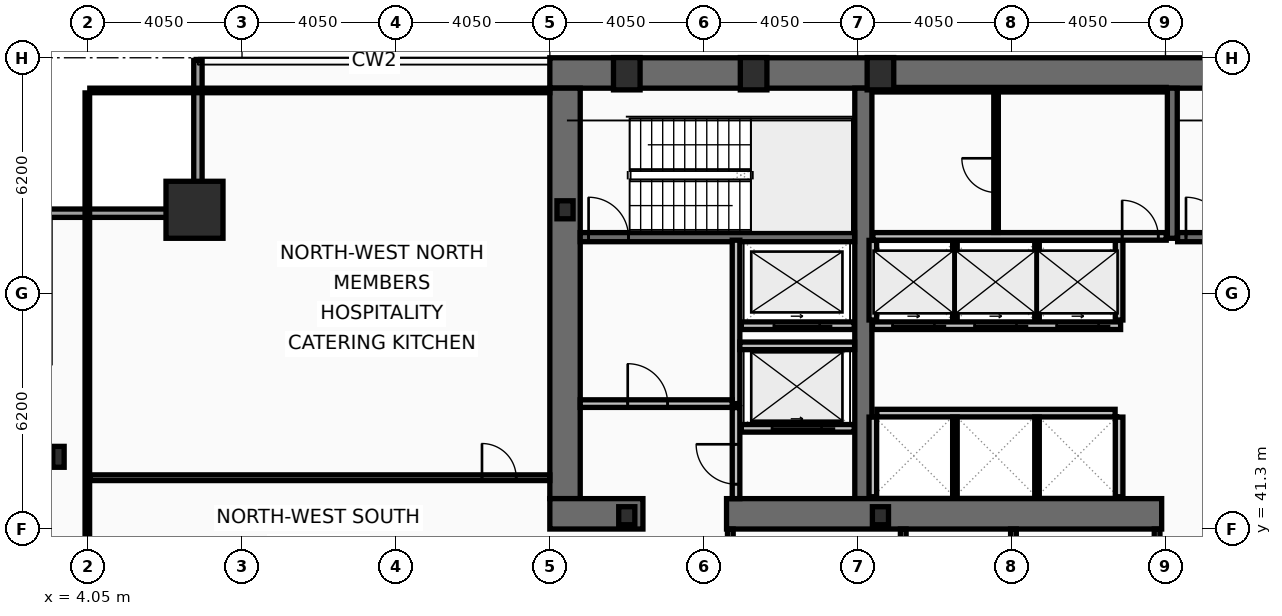
"""IFC4 building model, lengths in metres.
Left out: names, types, materials, properties, quantities, classifications, styles, units other than length and angle.
Written with IfcOpenShell. Run it as: python <this file> out.ifc"""

import sys

from ifc_helpers import new_model, si_unit, direction, frame, frame_2d, origin, origin_2d, place, context, subcontext, project, spatial, rectangle, hollow_rectangle, i_section, extrude, element, fill, save


model = new_model("IFC4")
c1 = context("Model", 3, precision=1e-05, world=origin(), true_north=direction((0.0, 1.0)))
c2 = subcontext(c1, "Body", "Model", "MODEL_VIEW")
j1 = project(units=[si_unit("LENGTHUNIT", "METRE"), si_unit("PLANEANGLEUNIT", "RADIAN")], contexts=[c1])
p1 = place(None, origin())
s1 = spatial("IfcSite", under=j1, at=p1, CompositionType="ELEMENT")
p2 = place(p1, origin())
s2 = spatial("IfcBuilding", under=s1, at=p2, CompositionType="ELEMENT")
p3 = place(p2, frame((0.0, 0.0, 81.8)))
s3 = spatial("IfcBuildingStorey", under=s2, at=p3, CompositionType="ELEMENT", Elevation=81.8)
p4 = place(p3, frame((16.2, 53.3, 0.0), z_axis=(0.0, 0.0, 1.0), x_axis=(1.0, 0.0, 0.0)))
e1 = element("IfcWall", 1, at=p4, inside=s3, PredefinedType="SHEAR", context=c2, shape_type="SweptSolid", body=[
    extrude(rectangle(XDim=40.5, YDim=0.8, at=frame_2d((20.25, 0.0))), origin(), (0.0, 0.0, 1.0), 3.78),
])
p5 = place(p3, frame((16.6, 42.1, 0.0), z_axis=(0.0, 0.0, 1.0), x_axis=(0.0, 1.0, 0.0)))
e2 = element("IfcWall", 2, at=p5, inside=s3, PredefinedType="SHEAR", context=c2, shape_type="SweptSolid", body=[
    extrude(rectangle(XDim=10.8, YDim=0.8, at=frame_2d((5.4, 0.0))), origin(), (0.0, 0.0, 1.0), 3.78),
])
p6 = place(p3, frame((24.45, 42.1, 0.0), z_axis=(0.0, 0.0, 1.0), x_axis=(0.0, 1.0, 0.0)))
e3 = element("IfcWall", 3, at=p6, inside=s3, PredefinedType="SHEAR", context=c2, shape_type="SweptSolid", body=[
    extrude(rectangle(XDim=10.8, YDim=0.45, at=frame_2d((5.4, 0.0))), origin(), (0.0, 0.0, 1.0), 3.78),
])
p7 = place(p3, frame((18.65, 41.7, 0.0), z_axis=(0.0, 0.0, 1.0), x_axis=(-1.0, 0.0, 0.0)))
e4 = element("IfcWall", 4, at=p7, inside=s3, PredefinedType="SHEAR", context=c2, shape_type="SweptSolid", body=[
    extrude(rectangle(XDim=2.45, YDim=0.8, at=frame_2d((1.225, 0.0))), origin(), (0.0, 0.0, 1.0), 3.78),
])
p8 = place(p3, frame((32.3, 41.7, 0.0), z_axis=(0.0, 0.0, 1.0), x_axis=(-1.0, 0.0, 0.0)))
e5 = element("IfcWall", 5, at=p8, inside=s3, PredefinedType="SHEAR", context=c2, shape_type="SweptSolid", body=[
    extrude(rectangle(XDim=11.45, YDim=0.8, at=frame_2d((5.725, 0.0))), origin(), (0.0, 0.0, 1.0), 3.78),
])
p9 = place(p3, frame((32.58, 48.95, 0.0), z_axis=(0.0, 0.0, 1.0), x_axis=(0.0, 1.0, 0.0)))
e6 = element("IfcWall", 6, at=p9, inside=s3, PredefinedType="SHEAR", context=c2, shape_type="SweptSolid", body=[
    extrude(rectangle(XDim=3.95, YDim=0.26, at=frame_2d((1.975, 0.0))), origin(), (0.0, 0.0, 1.0), 3.78),
])
p10 = place(p3, frame((17.0, 48.98, 0.0), z_axis=(0.0, 0.0, 1.0), x_axis=(1.0, 0.0, 0.0)))
e7 = element("IfcWall", 7, at=p10, inside=s3, PredefinedType="SHEAR", context=c2, shape_type="SweptSolid", body=[
    extrude(rectangle(XDim=7.22, YDim=0.24, at=frame_2d((3.61, 0.0))), origin(), (0.0, 0.0, 1.0), 3.78),
])
p11 = place(p10, frame((0.22, 0.0, 0.0)))
e8 = element("IfcOpeningElement", 8, at=p11, cuts=e7, PredefinedType="OPENING", context=c2, shape_type="SweptSolid", body=[
    extrude(rectangle(XDim=1.05, YDim=2.15, at=frame_2d((0.525, 1.075))), frame((0.0, 0.13, 0.0), z_axis=(0.0, -1.0, 0.0), x_axis=(1.0, 0.0, 0.0)), (0.0, 0.0, 1.0), 0.26),
])
p12 = place(p3, frame((32.72, 48.98, 0.0), z_axis=(0.0, 0.0, 1.0), x_axis=(1.0, 0.0, 0.0)))
e9 = element("IfcWall", 9, at=p12, inside=s3, PredefinedType="SHEAR", context=c2, shape_type="SweptSolid", body=[
    extrude(rectangle(XDim=7.56, YDim=0.24, at=frame_2d((3.78, 0.0))), origin(), (0.0, 0.0, 1.0), 3.78),
])
p13 = place(p12, frame((0.22, 0.0, 0.0)))
e10 = element("IfcOpeningElement", 10, at=p13, cuts=e9, PredefinedType="OPENING", context=c2, shape_type="SweptSolid", body=[
    extrude(rectangle(XDim=1.05, YDim=2.15, at=frame_2d((0.525, 1.075))), frame((0.0, 0.13, 0.0), z_axis=(0.0, -1.0, 0.0), x_axis=(1.0, 0.0, 0.0)), (0.0, 0.0, 1.0), 0.26),
])
p14 = place(p3, frame((6.85, 49.7, 0.0), z_axis=(0.0, 0.0, 1.0), x_axis=(1.0, 0.0, 0.0)))
e11 = element("IfcColumn", 11, at=p14, inside=s3, PredefinedType="COLUMN", context=c2, shape_type="SweptSolid", body=[
    extrude(hollow_rectangle(XDim=1.5, YDim=1.5, WallThickness=0.07, at=origin_2d()), origin(), (0.0, 0.0, 1.0), 4.0),
])
for number, where, z_axis, x_axis in (
    (12, (18.225, 53.28, 0.0), (0.0, 0.0, 1.0), (1.0, 0.0, 0.0)),
    (13, (21.562, 53.28, 0.0), (0.0, 0.0, 1.0), (1.0, 0.0, 0.0)),
    (14, (24.9, 53.28, 0.0), (0.0, 0.0, 1.0), (1.0, 0.0, 0.0)),
):
    element("IfcColumn", number, at=place(p3, frame(where, z_axis=z_axis, x_axis=x_axis)), inside=s3, PredefinedType="COLUMN", context=c2, shape_type="SweptSolid", body=[
        extrude(hollow_rectangle(XDim=0.7, YDim=0.85, WallThickness=0.05, at=origin_2d()), origin(), (0.0, 0.0, 1.0), 4.0),
    ])
p15 = place(p3, frame((3.27, 43.2, 0.0), z_axis=(0.0, 0.0, 1.0), x_axis=(1.0, 0.0, 0.0)))
e15 = element("IfcColumn", 15, at=p15, inside=s3, PredefinedType="COLUMN", context=c2, shape_type="SweptSolid", body=[
    extrude(i_section(OverallWidth=0.3, OverallDepth=0.55, WebThickness=0.015, FlangeThickness=0.029, at=origin_2d()), origin(), (0.0, 0.0, 1.0), 4.0),
])
for number, where, z_axis, x_axis in (
    (16, (16.6, 49.7, 0.0), (0.0, 0.0, 1.0), (1.0, 0.0, 0.0)),
    (17, (18.225, 41.65, 0.0), (0.0, 0.0, 1.0), (1.0, 0.0, 0.0)),
    (18, (24.9, 41.65, 0.0), (0.0, 0.0, 1.0), (1.0, 0.0, 0.0)),
):
    element("IfcColumn", number, at=place(p3, frame(where, z_axis=z_axis, x_axis=x_axis)), inside=s3, PredefinedType="COLUMN", context=c2, shape_type="SweptSolid", body=[
        extrude(i_section(OverallWidth=0.424, OverallDepth=0.474, WebThickness=0.048, FlangeThickness=0.077, at=origin_2d()), origin(), (0.0, 0.0, 1.0), 4.0),
    ])
p16 = place(p3, frame((2.83, 49.61, 0.0), z_axis=(0.0, 0.0, 1.0), x_axis=(1.0, 0.0, 0.0)))
e19 = element("IfcWall", 19, at=p16, inside=s3, PredefinedType="SOLIDWALL", context=c2, shape_type="SweptSolid", body=[
    extrude(rectangle(XDim=4.22, YDim=0.22, at=frame_2d((2.11, 0.0))), origin(), (0.0, 0.0, 1.0), 3.12),
])
p17 = place(p3, frame((6.94, 49.72, 0.0), z_axis=(0.0, 0.0, 1.0), x_axis=(0.0, 1.0, 0.0)))
e20 = element("IfcWall", 20, at=p17, inside=s3, PredefinedType="SOLIDWALL", context=c2, shape_type="SweptSolid", body=[
    extrude(rectangle(XDim=3.91, YDim=0.22, at=frame_2d((1.955, 0.0))), origin(), (0.0, 0.0, 1.0), 3.12),
])
p18 = place(p3, frame((24.21, 43.95, 0.0), z_axis=(0.0, 0.0, 1.0), x_axis=(-1.0, 0.0, 0.0)))
e21 = element("IfcWall", 21, at=p18, inside=s3, PredefinedType="PARTITIONING", context=c2, shape_type="SweptSolid", body=[
    extrude(rectangle(XDim=2.97, YDim=0.2, at=frame_2d((1.485, 0.0))), origin(), (0.0, 0.0, 1.0), 3.78),
])
p19 = place(p18, frame((0.86, 0.0, 0.0)))
e22 = element("IfcOpeningElement", 22, at=p19, cuts=e21, PredefinedType="OPENING", context=c2, shape_type="SweptSolid", body=[
    extrude(rectangle(XDim=1.3, YDim=2.18, at=frame_2d((0.65, 1.09))), frame((0.0, 0.11, 0.0), z_axis=(0.0, -1.0, 0.0), x_axis=(1.0, 0.0, 0.0)), (0.0, 0.0, 1.0), 0.22),
])
p20 = place(p3, frame((24.21, 46.65, 0.0), z_axis=(0.0, 0.0, 1.0), x_axis=(-1.0, 0.0, 0.0)))
e23 = element("IfcWall", 23, at=p20, inside=s3, PredefinedType="PARTITIONING", context=c2, shape_type="SweptSolid", body=[
    extrude(rectangle(XDim=2.97, YDim=0.2, at=frame_2d((1.485, 0.0))), origin(), (0.0, 0.0, 1.0), 3.78),
])
p21 = place(p20, frame((0.91, 0.0, 0.0)))
e24 = element("IfcOpeningElement", 24, at=p21, cuts=e23, PredefinedType="OPENING", context=c2, shape_type="SweptSolid", body=[
    extrude(rectangle(XDim=1.2, YDim=2.18, at=frame_2d((0.6, 1.09))), frame((0.0, 0.11, 0.0), z_axis=(0.0, -1.0, 0.0), x_axis=(1.0, 0.0, 0.0)), (0.0, 0.0, 1.0), 0.22),
])
p22 = place(p3, frame((31.22, 46.65, 0.0), z_axis=(0.0, 0.0, 1.0), x_axis=(-1.0, 0.0, 0.0)))
e25 = element("IfcWall", 25, at=p22, inside=s3, PredefinedType="PARTITIONING", context=c2, shape_type="SweptSolid", body=[
    extrude(rectangle(XDim=6.53, YDim=0.2, at=frame_2d((3.265, 0.0))), origin(), (0.0, 0.0, 1.0), 3.78),
])
p23 = place(p22, frame((4.9, 0.0, 0.0)))
e26 = element("IfcOpeningElement", 26, at=p23, cuts=e25, PredefinedType="OPENING", context=c2, shape_type="SweptSolid", body=[
    extrude(rectangle(XDim=1.1, YDim=2.18, at=frame_2d((0.55, 1.09))), frame((0.0, 0.11, 0.0), z_axis=(0.0, -1.0, 0.0), x_axis=(1.0, 0.0, 0.0)), (0.0, 0.0, 1.0), 0.22),
])
p24 = place(p22, frame((2.74, 0.0, 0.0)))
e27 = element("IfcOpeningElement", 27, at=p24, cuts=e25, PredefinedType="OPENING", context=c2, shape_type="SweptSolid", body=[
    extrude(rectangle(XDim=1.1, YDim=2.18, at=frame_2d((0.55, 1.09))), frame((0.0, 0.11, 0.0), z_axis=(0.0, -1.0, 0.0), x_axis=(1.0, 0.0, 0.0)), (0.0, 0.0, 1.0), 0.22),
])
p25 = place(p22, frame((0.58, 0.0, 0.0)))
e28 = element("IfcOpeningElement", 28, at=p25, cuts=e25, PredefinedType="OPENING", context=c2, shape_type="SweptSolid", body=[
    extrude(rectangle(XDim=1.1, YDim=2.18, at=frame_2d((0.55, 1.09))), frame((0.0, 0.11, 0.0), z_axis=(0.0, -1.0, 0.0), x_axis=(1.0, 0.0, 0.0)), (0.0, 0.0, 1.0), 0.22),
])
p26 = place(p3, frame((21.1, 44.6, 0.0), z_axis=(0.0, 0.0, 1.0), x_axis=(0.0, 1.0, 0.0)))
e29 = element("IfcWall", 29, at=p26, inside=s3, PredefinedType="PARTITIONING", context=c2, shape_type="SweptSolid", body=[
    extrude(rectangle(XDim=4.3, YDim=0.2, at=frame_2d((2.15, 0.0))), origin(), (0.0, 0.0, 1.0), 3.78),
])
p27 = place(p3, frame((17.0, 44.6, 0.0), z_axis=(0.0, 0.0, 1.0), x_axis=(1.0, 0.0, 0.0)))
e30 = element("IfcWall", 30, at=p27, inside=s3, PredefinedType="PARTITIONING", context=c2, shape_type="SweptSolid", body=[
    extrude(rectangle(XDim=4.0, YDim=0.2, at=frame_2d((2.0, 0.0))), origin(), (0.0, 0.0, 1.0), 3.78),
])
p28 = place(p27, frame((1.25, 0.0, 0.0)))
e31 = element("IfcOpeningElement", 31, at=p28, cuts=e30, PredefinedType="OPENING", context=c2, shape_type="SweptSolid", body=[
    extrude(rectangle(XDim=1.05, YDim=2.15, at=frame_2d((0.525, 1.075))), frame((0.0, 0.11, 0.0), z_axis=(0.0, -1.0, 0.0), x_axis=(1.0, 0.0, 0.0)), (0.0, 0.0, 1.0), 0.22),
])
p29 = place(p3, frame((21.2, 46.12, 0.0), z_axis=(0.0, 0.0, 1.0), x_axis=(1.0, 0.0, 0.0)))
e32 = element("IfcWall", 32, at=p29, inside=s3, PredefinedType="PARTITIONING", context=c2, shape_type="SweptSolid", body=[
    extrude(rectangle(XDim=3.02, YDim=0.2, at=frame_2d((1.51, 0.0))), origin(), (0.0, 0.0, 1.0), 3.78),
])
p30 = place(p3, frame((21.1, 42.1, 0.0), z_axis=(0.0, 0.0, 1.0), x_axis=(0.0, 1.0, 0.0)))
e33 = element("IfcWall", 33, at=p30, inside=s3, PredefinedType="PARTITIONING", context=c2, shape_type="SweptSolid", body=[
    extrude(rectangle(XDim=2.395, YDim=0.2, at=frame_2d((1.198, 0.0))), origin(), (0.0, 0.0, 1.0), 3.78),
])
p31 = place(p30, frame((0.38, 0.0, 0.0)))
e34 = element("IfcOpeningElement", 34, at=p31, cuts=e33, PredefinedType="OPENING", context=c2, shape_type="SweptSolid", body=[
    extrude(rectangle(XDim=1.05, YDim=2.15, at=frame_2d((0.525, 1.075))), frame((0.0, 0.11, 0.0), z_axis=(0.0, -1.0, 0.0), x_axis=(1.0, 0.0, 0.0)), (0.0, 0.0, 1.0), 0.22),
])
for number, where, z_axis, x_axis in (
    (35, (24.7, 46.8, 0.0), (0.0, 0.0, 1.0), (0.0, 1.0, 0.0)),
    (36, (31.18, 46.8, 0.0), (0.0, 0.0, 1.0), (0.0, 1.0, 0.0)),
):
    element("IfcWall", number, at=place(p3, frame(where, z_axis=z_axis, x_axis=x_axis)), inside=s3, PredefinedType="PARTITIONING", context=c2, shape_type="SweptSolid", body=[
        extrude(rectangle(XDim=2.095, YDim=0.2, at=frame_2d((1.047, 0.0))), origin(), (0.0, 0.0, 1.0), 3.78),
    ])
for number, where, z_axis, x_axis in (
    (37, (26.86, 46.8, 0.0), (0.0, 0.0, 1.0), (0.0, 1.0, 0.0)),
    (38, (29.02, 46.8, 0.0), (0.0, 0.0, 1.0), (0.0, 1.0, 0.0)),
):
    element("IfcWall", number, at=place(p3, frame(where, z_axis=z_axis, x_axis=x_axis)), inside=s3, PredefinedType="PARTITIONING", context=c2, shape_type="SweptSolid", body=[
        extrude(rectangle(XDim=2.095, YDim=0.12, at=frame_2d((1.047, 0.0))), origin(), (0.0, 0.0, 1.0), 3.78),
    ])
p32 = place(p3, frame((24.805, 44.35, 0.0), z_axis=(0.0, 0.0, 1.0), x_axis=(1.0, 0.0, 0.0)))
e39 = element("IfcWall", 39, at=p32, inside=s3, PredefinedType="PARTITIONING", context=c2, shape_type="SweptSolid", body=[
    extrude(rectangle(XDim=6.27, YDim=0.2, at=frame_2d((3.135, 0.0))), origin(), (0.0, 0.0, 1.0), 3.78),
])
for number, where, z_axis, x_axis in (
    (40, (24.7, 42.15, 0.0), (0.0, 0.0, 1.0), (0.0, 1.0, 0.0)),
    (41, (31.18, 42.15, 0.0), (0.0, 0.0, 1.0), (0.0, 1.0, 0.0)),
):
    element("IfcWall", number, at=place(p3, frame(where, z_axis=z_axis, x_axis=x_axis)), inside=s3, PredefinedType="PARTITIONING", context=c2, shape_type="SweptSolid", body=[
        extrude(rectangle(XDim=2.095, YDim=0.2, at=frame_2d((1.048, 0.0))), origin(), (0.0, 0.0, 1.0), 3.78),
    ])
for number, where, z_axis, x_axis in (
    (42, (26.86, 42.15, 0.0), (0.0, 0.0, 1.0), (0.0, 1.0, 0.0)),
    (43, (29.02, 42.15, 0.0), (0.0, 0.0, 1.0), (0.0, 1.0, 0.0)),
):
    element("IfcWall", number, at=place(p3, frame(where, z_axis=z_axis, x_axis=x_axis)), inside=s3, PredefinedType="PARTITIONING", context=c2, shape_type="SweptSolid", body=[
        extrude(rectangle(XDim=2.095, YDim=0.12, at=frame_2d((1.048, 0.0))), origin(), (0.0, 0.0, 1.0), 3.78),
    ])
p33 = place(p3, frame((24.7, 52.86, 0.0), z_axis=(0.0, 0.0, 1.0), x_axis=(1.0, 0.0, 0.0)))
e44 = element("IfcWall", 44, at=p33, inside=s3, PredefinedType="PARTITIONING", context=c2, shape_type="SweptSolid", body=[
    extrude(rectangle(XDim=7.72, YDim=0.12, at=frame_2d((3.86, 0.0))), origin(), (0.0, 0.0, 1.0), 3.78),
])
p34 = place(p3, frame((24.7, 49.0, 0.0), z_axis=(0.0, 0.0, 1.0), x_axis=(1.0, 0.0, 0.0)))
e45 = element("IfcWall", 45, at=p34, inside=s3, PredefinedType="PARTITIONING", context=c2, shape_type="SweptSolid", body=[
    extrude(rectangle(XDim=7.72, YDim=0.2, at=frame_2d((3.86, 0.0))), origin(), (0.0, 0.0, 1.0), 3.78),
])
p35 = place(p34, frame((6.56, 0.0, 0.0)))
e46 = element("IfcOpeningElement", 46, at=p35, cuts=e45, PredefinedType="OPENING", context=c2, shape_type="SweptSolid", body=[
    extrude(rectangle(XDim=0.95, YDim=2.1, at=frame_2d((0.475, 1.05))), frame((0.0, 0.11, 0.0), z_axis=(0.0, -1.0, 0.0), x_axis=(1.0, 0.0, 0.0)), (0.0, 0.0, 1.0), 0.22),
])
p36 = place(p3, frame((27.942, 49.105, 0.0), z_axis=(0.0, 0.0, 1.0), x_axis=(0.0, 1.0, 0.0)))
e47 = element("IfcWall", 47, at=p36, inside=s3, PredefinedType="PARTITIONING", context=c2, shape_type="SweptSolid", body=[
    extrude(rectangle(XDim=3.69, YDim=0.12, at=frame_2d((1.845, 0.0))), origin(), (0.0, 0.0, 1.0), 3.78),
])
p37 = place(p36, frame((1.05, 0.0, 0.0)))
e48 = element("IfcOpeningElement", 48, at=p37, cuts=e47, PredefinedType="OPENING", context=c2, shape_type="SweptSolid", body=[
    extrude(rectangle(XDim=0.9, YDim=2.05, at=frame_2d((0.45, 1.025))), frame((0.0, 0.07, 0.0), z_axis=(0.0, -1.0, 0.0), x_axis=(1.0, 0.0, 0.0)), (0.0, 0.0, 1.0), 0.14),
])
for number, where, z_axis, x_axis in (
    (49, (20.95, 38.28, 0.0), (0.0, 0.0, 1.0), (0.0, 1.0, 0.0)),
    (50, (25.5, 38.28, 0.0), (0.0, 0.0, 1.0), (0.0, 1.0, 0.0)),
    (51, (28.4, 38.28, 0.0), (0.0, 0.0, 1.0), (0.0, 1.0, 0.0)),
    (52, (32.18, 38.28, 0.0), (0.0, 0.0, 1.0), (0.0, 1.0, 0.0)),
):
    element("IfcWall", number, at=place(p3, frame(where, z_axis=z_axis, x_axis=x_axis)), inside=s3, PredefinedType="PARTITIONING", context=c2, shape_type="SweptSolid", body=[
        extrude(rectangle(XDim=3.02, YDim=0.15, at=frame_2d((1.51, 0.0))), origin(), (0.0, 0.0, 1.0), 3.78),
    ])
p38 = place(p3, frame((4.095, 42.65, 0.0), z_axis=(0.0, 0.0, 1.0), x_axis=(1.0, 0.0, 0.0)))
e53 = element("IfcWall", 53, at=p38, inside=s3, PredefinedType="PARTITIONING", context=c2, shape_type="SweptSolid", body=[
    extrude(rectangle(XDim=12.105, YDim=0.15, at=frame_2d((6.052, 0.0))), origin(), (0.0, 0.0, 1.0), 2.97),
])
p39 = place(p38, frame((10.32, 0.0, 0.0)))
e54 = element("IfcOpeningElement", 54, at=p39, cuts=e53, PredefinedType="OPENING", context=c2, shape_type="SweptSolid", body=[
    extrude(rectangle(XDim=0.9, YDim=2.05, at=frame_2d((0.45, 1.025))), frame((0.0, 0.085, 0.0), z_axis=(0.0, -1.0, 0.0), x_axis=(1.0, 0.0, 0.0)), (0.0, 0.0, 1.0), 0.17),
])
p40 = place(p3, frame((4.03, 10.665, 0.0), z_axis=(0.0, 0.0, 1.0), x_axis=(0.0, 1.0, 0.0)))
e55 = element("IfcWall", 55, at=p40, inside=s3, PredefinedType="PARTITIONING", context=c2, shape_type="SweptSolid", body=[
    extrude(rectangle(XDim=42.11, YDim=0.12, at=frame_2d((21.055, 0.0))), origin(), (0.0, 0.0, 1.0), 2.97),
])
p41 = place(p3, frame((4.095, 52.84, 0.0), z_axis=(0.0, 0.0, 1.0), x_axis=(1.0, 0.0, 0.0)))
e56 = element("IfcWall", 56, at=p41, inside=s3, PredefinedType="PARTITIONING", context=c2, shape_type="SweptSolid", body=[
    extrude(rectangle(XDim=12.105, YDim=0.12, at=frame_2d((6.052, 0.0))), origin(), (0.0, 0.0, 1.0), 3.78),
])
p42 = place(p11, origin())
e57 = element("IfcDoor", 57, at=p42, inside=s3, OperationType="SINGLE_SWING_LEFT", PredefinedType="DOOR", context=c2, shape_type="SweptSolid", body=[
    extrude(rectangle(XDim=1.05, YDim=2.15, at=frame_2d((0.525, 1.075))), frame((0.0, 0.025, 0.0), z_axis=(0.0, -1.0, 0.0), x_axis=(1.0, 0.0, 0.0)), (0.0, 0.0, 1.0), 0.05),
])
fill(e8, e57)
p43 = place(p13, origin())
e58 = element("IfcDoor", 58, at=p43, inside=s3, OperationType="SINGLE_SWING_LEFT", PredefinedType="DOOR", context=c2, shape_type="SweptSolid", body=[
    extrude(rectangle(XDim=1.05, YDim=2.15, at=frame_2d((0.525, 1.075))), frame((0.0, 0.025, 0.0), z_axis=(0.0, -1.0, 0.0), x_axis=(1.0, 0.0, 0.0)), (0.0, 0.0, 1.0), 0.05),
])
fill(e10, e58)
p44 = place(p19, origin())
e59 = element("IfcDoor", 59, at=p44, inside=s3, OperationType="SLIDING_TO_LEFT", PredefinedType="DOOR", context=c2, shape_type="SweptSolid", body=[
    extrude(rectangle(XDim=1.3, YDim=2.18, at=frame_2d((0.65, 1.09))), frame((0.0, 0.025, 0.0), z_axis=(0.0, -1.0, 0.0), x_axis=(1.0, 0.0, 0.0)), (0.0, 0.0, 1.0), 0.05),
])
fill(e22, e59)
p45 = place(p21, origin())
e60 = element("IfcDoor", 60, at=p45, inside=s3, OperationType="SLIDING_TO_LEFT", PredefinedType="DOOR", context=c2, shape_type="SweptSolid", body=[
    extrude(rectangle(XDim=1.2, YDim=2.18, at=frame_2d((0.6, 1.09))), frame((0.0, 0.025, 0.0), z_axis=(0.0, -1.0, 0.0), x_axis=(1.0, 0.0, 0.0)), (0.0, 0.0, 1.0), 0.05),
])
fill(e24, e60)
p46 = place(p23, origin())
e61 = element("IfcDoor", 61, at=p46, inside=s3, OperationType="SLIDING_TO_LEFT", PredefinedType="DOOR", context=c2, shape_type="SweptSolid", body=[
    extrude(rectangle(XDim=1.1, YDim=2.18, at=frame_2d((0.55, 1.09))), frame((0.0, 0.025, 0.0), z_axis=(0.0, -1.0, 0.0), x_axis=(1.0, 0.0, 0.0)), (0.0, 0.0, 1.0), 0.05),
])
fill(e26, e61)
p47 = place(p24, origin())
e62 = element("IfcDoor", 62, at=p47, inside=s3, OperationType="SLIDING_TO_LEFT", PredefinedType="DOOR", context=c2, shape_type="SweptSolid", body=[
    extrude(rectangle(XDim=1.1, YDim=2.18, at=frame_2d((0.55, 1.09))), frame((0.0, 0.025, 0.0), z_axis=(0.0, -1.0, 0.0), x_axis=(1.0, 0.0, 0.0)), (0.0, 0.0, 1.0), 0.05),
])
fill(e27, e62)
p48 = place(p25, origin())
e63 = element("IfcDoor", 63, at=p48, inside=s3, OperationType="SLIDING_TO_LEFT", PredefinedType="DOOR", context=c2, shape_type="SweptSolid", body=[
    extrude(rectangle(XDim=1.1, YDim=2.18, at=frame_2d((0.55, 1.09))), frame((0.0, 0.025, 0.0), z_axis=(0.0, -1.0, 0.0), x_axis=(1.0, 0.0, 0.0)), (0.0, 0.0, 1.0), 0.05),
])
fill(e28, e63)
p49 = place(p28, origin())
e64 = element("IfcDoor", 64, at=p49, inside=s3, OperationType="SINGLE_SWING_LEFT", PredefinedType="DOOR", context=c2, shape_type="SweptSolid", body=[
    extrude(rectangle(XDim=1.05, YDim=2.15, at=frame_2d((0.525, 1.075))), frame((0.0, 0.025, 0.0), z_axis=(0.0, -1.0, 0.0), x_axis=(1.0, 0.0, 0.0)), (0.0, 0.0, 1.0), 0.05),
])
fill(e31, e64)
p50 = place(p31, origin())
e65 = element("IfcDoor", 65, at=p50, inside=s3, OperationType="SINGLE_SWING_RIGHT", PredefinedType="DOOR", context=c2, shape_type="SweptSolid", body=[
    extrude(rectangle(XDim=1.05, YDim=2.15, at=frame_2d((0.525, 1.075))), frame((0.0, 0.025, 0.0), z_axis=(0.0, -1.0, 0.0), x_axis=(1.0, 0.0, 0.0)), (0.0, 0.0, 1.0), 0.05),
])
fill(e34, e65)
p51 = place(p35, origin())
e66 = element("IfcDoor", 66, at=p51, inside=s3, OperationType="SINGLE_SWING_LEFT", PredefinedType="DOOR", context=c2, shape_type="SweptSolid", body=[
    extrude(rectangle(XDim=0.95, YDim=2.1, at=frame_2d((0.475, 1.05))), frame((0.0, 0.025, 0.0), z_axis=(0.0, -1.0, 0.0), x_axis=(1.0, 0.0, 0.0)), (0.0, 0.0, 1.0), 0.05),
])
fill(e46, e66)
p52 = place(p37, origin())
e67 = element("IfcDoor", 67, at=p52, inside=s3, OperationType="SINGLE_SWING_RIGHT", PredefinedType="DOOR", context=c2, shape_type="SweptSolid", body=[
    extrude(rectangle(XDim=0.9, YDim=2.05, at=frame_2d((0.45, 1.025))), frame((0.0, 0.025, 0.0), z_axis=(0.0, -1.0, 0.0), x_axis=(1.0, 0.0, 0.0)), (0.0, 0.0, 1.0), 0.05),
])
fill(e48, e67)
p53 = place(p39, origin())
e68 = element("IfcDoor", 68, at=p53, inside=s3, OperationType="SINGLE_SWING_LEFT", PredefinedType="DOOR", context=c2, shape_type="SweptSolid", body=[
    extrude(rectangle(XDim=0.9, YDim=2.05, at=frame_2d((0.45, 1.025))), frame((0.0, 0.025, 0.0), z_axis=(0.0, -1.0, 0.0), x_axis=(1.0, 0.0, 0.0)), (0.0, 0.0, 1.0), 0.05),
])
fill(e54, e68)
save(model, sys.argv[1])
